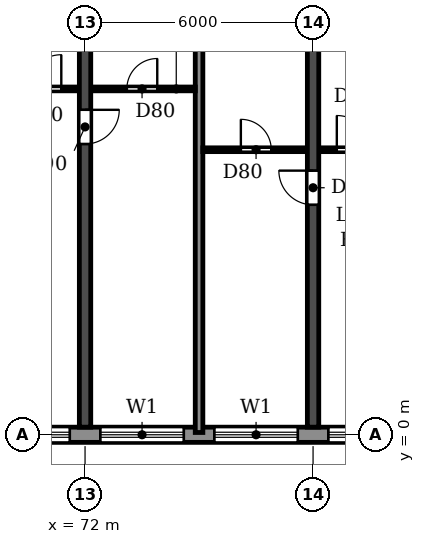
"""IFC4 building model, lengths in metres.
Left out: names, types, materials, properties, quantities, classifications, styles, units other than length and angle.
Written with IfcOpenShell. Run it as: python <this file> out.ifc"""

import sys

from ifc_helpers import new_model, si_unit, direction, frame, frame_2d, origin, place, context, subcontext, project, spatial, rectangle, extrude, element, fill, save


model = new_model("IFC4")
c1 = context("Model", 3, precision=1e-05, world=origin(), true_north=direction((0.0, 1.0)))
c2 = subcontext(c1, "Body", "Model", "MODEL_VIEW")
j1 = project(units=[si_unit("LENGTHUNIT", "METRE"), si_unit("PLANEANGLEUNIT", "RADIAN")], contexts=[c1])
p1 = place(None, origin())
s1 = spatial("IfcSite", under=j1, at=p1, CompositionType="ELEMENT")
p2 = place(p1, origin())
s2 = spatial("IfcBuilding", under=s1, at=p2, CompositionType="ELEMENT")
p3 = place(p2, frame((0.0, 0.0, 142.2)))
s3 = spatial("IfcBuildingStorey", under=s2, at=p3, CompositionType="ELEMENT", Elevation=142.2)
p4 = place(p3, frame((72.0, 0.2, 0.0), z_axis=(0.0, 0.0, 1.0), x_axis=(0.0, 1.0, 0.0)))
e1 = element("IfcWall", 1, at=p4, inside=s3, PredefinedType="SHEAR", context=c2, shape_type="SweptSolid", body=[
    extrude(rectangle(XDim=11.675, YDim=0.3, at=frame_2d((5.837, 0.0))), origin(), (0.0, 0.0, 1.0), 3.07),
])
p5 = place(p4, frame((7.45, 0.0, 0.0)))
e2 = element("IfcOpeningElement", 2, at=p5, cuts=e1, PredefinedType="OPENING", context=c2, shape_type="SweptSolid", body=[
    extrude(rectangle(XDim=0.9, YDim=2.1, at=frame_2d((0.45, 1.05))), frame((0.0, 0.16, 0.0), z_axis=(0.0, -1.0, 0.0), x_axis=(1.0, 0.0, 0.0)), (0.0, 0.0, 1.0), 0.32),
])
p6 = place(p3, frame((78.0, 0.2, 0.0), z_axis=(0.0, 0.0, 1.0), x_axis=(0.0, 1.0, 0.0)))
e3 = element("IfcWall", 3, at=p6, inside=s3, PredefinedType="SHEAR", context=c2, shape_type="SweptSolid", body=[
    extrude(rectangle(XDim=11.675, YDim=0.3, at=frame_2d((5.837, 0.0))), origin(), (0.0, 0.0, 1.0), 3.07),
])
p7 = place(p6, frame((5.85, 0.0, 0.0)))
e4 = element("IfcOpeningElement", 4, at=p7, cuts=e3, PredefinedType="OPENING", context=c2, shape_type="SweptSolid", body=[
    extrude(rectangle(XDim=0.9, YDim=2.1, at=frame_2d((0.45, 1.05))), frame((0.0, 0.16, 0.0), z_axis=(0.0, -1.0, 0.0), x_axis=(1.0, 0.0, 0.0)), (0.0, 0.0, 1.0), 0.32),
])
p8 = place(p3, frame((16.683, 0.0, 0.0), z_axis=(0.0, 0.0, 1.0), x_axis=(1.0, 0.0, 0.0)))
e5 = element("IfcWall", 5, at=p8, inside=s3, PredefinedType="STANDARD", context=c2, shape_type="SweptSolid", body=[
    extrude(rectangle(XDim=68.634, YDim=0.4, at=frame_2d((34.317, 0.0))), origin(), (0.0, 0.0, 1.0), 3.07),
])
p9 = place(p8, frame((1.717, 0.0, 0.9)))
e6 = element("IfcOpeningElement", 6, at=p9, cuts=e5, PredefinedType="OPENING", context=c2, shape_type="SweptSolid", body=[
    extrude(rectangle(XDim=2.2, YDim=1.5, at=frame_2d((1.1, 0.75))), frame((0.0, 0.21, 0.0), z_axis=(0.0, -1.0, 0.0), x_axis=(1.0, 0.0, 0.0)), (0.0, 0.0, 1.0), 0.42),
])
p10 = place(p8, frame((4.717, 0.0, 0.9)))
e7 = element("IfcOpeningElement", 7, at=p10, cuts=e5, PredefinedType="OPENING", context=c2, shape_type="SweptSolid", body=[
    extrude(rectangle(XDim=2.2, YDim=1.5, at=frame_2d((1.1, 0.75))), frame((0.0, 0.21, 0.0), z_axis=(0.0, -1.0, 0.0), x_axis=(1.0, 0.0, 0.0)), (0.0, 0.0, 1.0), 0.42),
])
p11 = place(p8, frame((7.717, 0.0, 0.9)))
e8 = element("IfcOpeningElement", 8, at=p11, cuts=e5, PredefinedType="OPENING", context=c2, shape_type="SweptSolid", body=[
    extrude(rectangle(XDim=2.2, YDim=1.5, at=frame_2d((1.1, 0.75))), frame((0.0, 0.21, 0.0), z_axis=(0.0, -1.0, 0.0), x_axis=(1.0, 0.0, 0.0)), (0.0, 0.0, 1.0), 0.42),
])
p12 = place(p8, frame((10.717, 0.0, 0.9)))
e9 = element("IfcOpeningElement", 9, at=p12, cuts=e5, PredefinedType="OPENING", context=c2, shape_type="SweptSolid", body=[
    extrude(rectangle(XDim=2.2, YDim=1.5, at=frame_2d((1.1, 0.75))), frame((0.0, 0.21, 0.0), z_axis=(0.0, -1.0, 0.0), x_axis=(1.0, 0.0, 0.0)), (0.0, 0.0, 1.0), 0.42),
])
p13 = place(p8, frame((13.717, 0.0, 0.9)))
e10 = element("IfcOpeningElement", 10, at=p13, cuts=e5, PredefinedType="OPENING", context=c2, shape_type="SweptSolid", body=[
    extrude(rectangle(XDim=2.2, YDim=1.5, at=frame_2d((1.1, 0.75))), frame((0.0, 0.21, 0.0), z_axis=(0.0, -1.0, 0.0), x_axis=(1.0, 0.0, 0.0)), (0.0, 0.0, 1.0), 0.42),
])
p14 = place(p8, frame((16.717, 0.0, 0.9)))
e11 = element("IfcOpeningElement", 11, at=p14, cuts=e5, PredefinedType="OPENING", context=c2, shape_type="SweptSolid", body=[
    extrude(rectangle(XDim=2.2, YDim=1.5, at=frame_2d((1.1, 0.75))), frame((0.0, 0.21, 0.0), z_axis=(0.0, -1.0, 0.0), x_axis=(1.0, 0.0, 0.0)), (0.0, 0.0, 1.0), 0.42),
])
p15 = place(p8, frame((19.717, 0.0, 0.9)))
e12 = element("IfcOpeningElement", 12, at=p15, cuts=e5, PredefinedType="OPENING", context=c2, shape_type="SweptSolid", body=[
    extrude(rectangle(XDim=2.2, YDim=1.5, at=frame_2d((1.1, 0.75))), frame((0.0, 0.21, 0.0), z_axis=(0.0, -1.0, 0.0), x_axis=(1.0, 0.0, 0.0)), (0.0, 0.0, 1.0), 0.42),
])
p16 = place(p8, frame((22.717, 0.0, 0.9)))
e13 = element("IfcOpeningElement", 13, at=p16, cuts=e5, PredefinedType="OPENING", context=c2, shape_type="SweptSolid", body=[
    extrude(rectangle(XDim=2.2, YDim=1.5, at=frame_2d((1.1, 0.75))), frame((0.0, 0.21, 0.0), z_axis=(0.0, -1.0, 0.0), x_axis=(1.0, 0.0, 0.0)), (0.0, 0.0, 1.0), 0.42),
])
p17 = place(p8, frame((25.717, 0.0, 0.9)))
e14 = element("IfcOpeningElement", 14, at=p17, cuts=e5, PredefinedType="OPENING", context=c2, shape_type="SweptSolid", body=[
    extrude(rectangle(XDim=2.2, YDim=1.5, at=frame_2d((1.1, 0.75))), frame((0.0, 0.21, 0.0), z_axis=(0.0, -1.0, 0.0), x_axis=(1.0, 0.0, 0.0)), (0.0, 0.0, 1.0), 0.42),
])
p18 = place(p8, frame((28.717, 0.0, 0.9)))
e15 = element("IfcOpeningElement", 15, at=p18, cuts=e5, PredefinedType="OPENING", context=c2, shape_type="SweptSolid", body=[
    extrude(rectangle(XDim=2.2, YDim=1.5, at=frame_2d((1.1, 0.75))), frame((0.0, 0.21, 0.0), z_axis=(0.0, -1.0, 0.0), x_axis=(1.0, 0.0, 0.0)), (0.0, 0.0, 1.0), 0.42),
])
p19 = place(p8, frame((31.717, 0.0, 0.9)))
e16 = element("IfcOpeningElement", 16, at=p19, cuts=e5, PredefinedType="OPENING", context=c2, shape_type="SweptSolid", body=[
    extrude(rectangle(XDim=2.2, YDim=1.5, at=frame_2d((1.1, 0.75))), frame((0.0, 0.21, 0.0), z_axis=(0.0, -1.0, 0.0), x_axis=(1.0, 0.0, 0.0)), (0.0, 0.0, 1.0), 0.42),
])
p20 = place(p8, frame((34.917, 0.0, 0.0)))
e17 = element("IfcOpeningElement", 17, at=p20, cuts=e5, PredefinedType="OPENING", context=c2, shape_type="SweptSolid", body=[
    extrude(rectangle(XDim=1.8, YDim=2.4, at=frame_2d((0.9, 1.2))), frame((0.0, 0.21, 0.0), z_axis=(0.0, -1.0, 0.0), x_axis=(1.0, 0.0, 0.0)), (0.0, 0.0, 1.0), 0.42),
])
p21 = place(p8, frame((37.717, 0.0, 0.9)))
e18 = element("IfcOpeningElement", 18, at=p21, cuts=e5, PredefinedType="OPENING", context=c2, shape_type="SweptSolid", body=[
    extrude(rectangle(XDim=2.2, YDim=1.5, at=frame_2d((1.1, 0.75))), frame((0.0, 0.21, 0.0), z_axis=(0.0, -1.0, 0.0), x_axis=(1.0, 0.0, 0.0)), (0.0, 0.0, 1.0), 0.42),
])
p22 = place(p8, frame((40.717, 0.0, 0.9)))
e19 = element("IfcOpeningElement", 19, at=p22, cuts=e5, PredefinedType="OPENING", context=c2, shape_type="SweptSolid", body=[
    extrude(rectangle(XDim=2.2, YDim=1.5, at=frame_2d((1.1, 0.75))), frame((0.0, 0.21, 0.0), z_axis=(0.0, -1.0, 0.0), x_axis=(1.0, 0.0, 0.0)), (0.0, 0.0, 1.0), 0.42),
])
p23 = place(p8, frame((43.717, 0.0, 0.9)))
e20 = element("IfcOpeningElement", 20, at=p23, cuts=e5, PredefinedType="OPENING", context=c2, shape_type="SweptSolid", body=[
    extrude(rectangle(XDim=2.2, YDim=1.5, at=frame_2d((1.1, 0.75))), frame((0.0, 0.21, 0.0), z_axis=(0.0, -1.0, 0.0), x_axis=(1.0, 0.0, 0.0)), (0.0, 0.0, 1.0), 0.42),
])
p24 = place(p8, frame((46.917, 0.0, 0.0)))
e21 = element("IfcOpeningElement", 21, at=p24, cuts=e5, PredefinedType="OPENING", context=c2, shape_type="SweptSolid", body=[
    extrude(rectangle(XDim=1.8, YDim=2.4, at=frame_2d((0.9, 1.2))), frame((0.0, 0.21, 0.0), z_axis=(0.0, -1.0, 0.0), x_axis=(1.0, 0.0, 0.0)), (0.0, 0.0, 1.0), 0.42),
])
p25 = place(p8, frame((49.717, 0.0, 0.9)))
e22 = element("IfcOpeningElement", 22, at=p25, cuts=e5, PredefinedType="OPENING", context=c2, shape_type="SweptSolid", body=[
    extrude(rectangle(XDim=2.2, YDim=1.5, at=frame_2d((1.1, 0.75))), frame((0.0, 0.21, 0.0), z_axis=(0.0, -1.0, 0.0), x_axis=(1.0, 0.0, 0.0)), (0.0, 0.0, 1.0), 0.42),
])
p26 = place(p8, frame((52.717, 0.0, 0.9)))
e23 = element("IfcOpeningElement", 23, at=p26, cuts=e5, PredefinedType="OPENING", context=c2, shape_type="SweptSolid", body=[
    extrude(rectangle(XDim=2.2, YDim=1.5, at=frame_2d((1.1, 0.75))), frame((0.0, 0.21, 0.0), z_axis=(0.0, -1.0, 0.0), x_axis=(1.0, 0.0, 0.0)), (0.0, 0.0, 1.0), 0.42),
])
p27 = place(p8, frame((55.717, 0.0, 0.9)))
e24 = element("IfcOpeningElement", 24, at=p27, cuts=e5, PredefinedType="OPENING", context=c2, shape_type="SweptSolid", body=[
    extrude(rectangle(XDim=2.2, YDim=1.5, at=frame_2d((1.1, 0.75))), frame((0.0, 0.21, 0.0), z_axis=(0.0, -1.0, 0.0), x_axis=(1.0, 0.0, 0.0)), (0.0, 0.0, 1.0), 0.42),
])
p28 = place(p8, frame((58.717, 0.0, 0.9)))
e25 = element("IfcOpeningElement", 25, at=p28, cuts=e5, PredefinedType="OPENING", context=c2, shape_type="SweptSolid", body=[
    extrude(rectangle(XDim=2.2, YDim=1.5, at=frame_2d((1.1, 0.75))), frame((0.0, 0.21, 0.0), z_axis=(0.0, -1.0, 0.0), x_axis=(1.0, 0.0, 0.0)), (0.0, 0.0, 1.0), 0.42),
])
p29 = place(p8, frame((61.717, 0.0, 0.9)))
e26 = element("IfcOpeningElement", 26, at=p29, cuts=e5, PredefinedType="OPENING", context=c2, shape_type="SweptSolid", body=[
    extrude(rectangle(XDim=2.2, YDim=1.5, at=frame_2d((1.1, 0.75))), frame((0.0, 0.21, 0.0), z_axis=(0.0, -1.0, 0.0), x_axis=(1.0, 0.0, 0.0)), (0.0, 0.0, 1.0), 0.42),
])
p30 = place(p8, frame((64.717, 0.0, 0.9)))
e27 = element("IfcOpeningElement", 27, at=p30, cuts=e5, PredefinedType="OPENING", context=c2, shape_type="SweptSolid", body=[
    extrude(rectangle(XDim=2.2, YDim=1.5, at=frame_2d((1.1, 0.75))), frame((0.0, 0.21, 0.0), z_axis=(0.0, -1.0, 0.0), x_axis=(1.0, 0.0, 0.0)), (0.0, 0.0, 1.0), 0.42),
])
p31 = place(p3, frame((75.0, 0.06, 0.0), z_axis=(0.0, 0.0, 1.0), x_axis=(0.0, 1.0, 0.0)))
e28 = element("IfcWall", 28, at=p31, inside=s3, PredefinedType="PARTITIONING", context=c2, shape_type="SweptSolid", body=[
    extrude(rectangle(XDim=11.805, YDim=0.2, at=frame_2d((5.902, 0.0))), origin(), (0.0, 0.0, 1.0), 3.07),
])
p32 = place(p3, frame((75.1, 7.5, 0.0), z_axis=(0.0, 0.0, 1.0), x_axis=(1.0, 0.0, 0.0)))
e29 = element("IfcWall", 29, at=p32, inside=s3, PredefinedType="PARTITIONING", context=c2, shape_type="SweptSolid", body=[
    extrude(rectangle(XDim=2.74, YDim=0.1, at=frame_2d((1.37, 0.0))), origin(), (0.0, 0.0, 1.0), 3.07),
])
p33 = place(p32, frame((1.0, 0.0, 0.0)))
e30 = element("IfcOpeningElement", 30, at=p33, cuts=e29, PredefinedType="OPENING", context=c2, shape_type="SweptSolid", body=[
    extrude(rectangle(XDim=0.8, YDim=2.1, at=frame_2d((0.4, 1.05))), frame((0.0, 0.06, 0.0), z_axis=(0.0, -1.0, 0.0), x_axis=(1.0, 0.0, 0.0)), (0.0, 0.0, 1.0), 0.12),
])
p34 = place(p3, frame((78.16, 7.5, 0.0), z_axis=(0.0, 0.0, 1.0), x_axis=(1.0, 0.0, 0.0)))
e31 = element("IfcWall", 31, at=p34, inside=s3, PredefinedType="PARTITIONING", context=c2, shape_type="SweptSolid", body=[
    extrude(rectangle(XDim=2.04, YDim=0.1, at=frame_2d((1.02, 0.0))), origin(), (0.0, 0.0, 1.0), 3.07),
])
p35 = place(p34, frame((0.465, 0.0, 0.0)))
e32 = element("IfcOpeningElement", 32, at=p35, cuts=e31, PredefinedType="OPENING", context=c2, shape_type="SweptSolid", body=[
    extrude(rectangle(XDim=0.9, YDim=2.1, at=frame_2d((0.45, 1.05))), frame((0.0, 0.06, 0.0), z_axis=(0.0, -1.0, 0.0), x_axis=(1.0, 0.0, 0.0)), (0.0, 0.0, 1.0), 0.12),
])
p36 = place(p3, frame((69.8, 9.1, 0.0), z_axis=(0.0, 0.0, 1.0), x_axis=(1.0, 0.0, 0.0)))
e33 = element("IfcWall", 33, at=p36, inside=s3, PredefinedType="PARTITIONING", context=c2, shape_type="SweptSolid", body=[
    extrude(rectangle(XDim=2.04, YDim=0.1, at=frame_2d((1.02, 0.0))), origin(), (0.0, 0.0, 1.0), 3.07),
])
p37 = place(p36, frame((0.675, 0.0, 0.0)))
e34 = element("IfcOpeningElement", 34, at=p37, cuts=e33, PredefinedType="OPENING", context=c2, shape_type="SweptSolid", body=[
    extrude(rectangle(XDim=0.9, YDim=2.1, at=frame_2d((0.45, 1.05))), frame((0.0, 0.06, 0.0), z_axis=(0.0, -1.0, 0.0), x_axis=(1.0, 0.0, 0.0)), (0.0, 0.0, 1.0), 0.12),
])
p38 = place(p3, frame((72.16, 9.1, 0.0), z_axis=(0.0, 0.0, 1.0), x_axis=(1.0, 0.0, 0.0)))
e35 = element("IfcWall", 35, at=p38, inside=s3, PredefinedType="PARTITIONING", context=c2, shape_type="SweptSolid", body=[
    extrude(rectangle(XDim=2.74, YDim=0.1, at=frame_2d((1.37, 0.0))), origin(), (0.0, 0.0, 1.0), 3.07),
])
p39 = place(p38, frame((0.94, 0.0, 0.0)))
e36 = element("IfcOpeningElement", 36, at=p39, cuts=e35, PredefinedType="OPENING", context=c2, shape_type="SweptSolid", body=[
    extrude(rectangle(XDim=0.8, YDim=2.1, at=frame_2d((0.4, 1.05))), frame((0.0, 0.06, 0.0), z_axis=(0.0, -1.0, 0.0), x_axis=(1.0, 0.0, 0.0)), (0.0, 0.0, 1.0), 0.12),
])
p40 = place(p26, origin())
e37 = element("IfcWindow", 37, at=p40, inside=s3, PartitioningType="DOUBLE_PANEL_HORIZONTAL", PredefinedType="WINDOW", context=c2, shape_type="SweptSolid", body=[
    extrude(rectangle(XDim=2.2, YDim=1.5, at=frame_2d((1.1, 0.75))), frame((0.0, 0.03, 0.0), z_axis=(0.0, -1.0, 0.0), x_axis=(1.0, 0.0, 0.0)), (0.0, 0.0, 1.0), 0.06),
])
fill(e23, e37)
p41 = place(p27, origin())
e38 = element("IfcWindow", 38, at=p41, inside=s3, PartitioningType="DOUBLE_PANEL_HORIZONTAL", PredefinedType="WINDOW", context=c2, shape_type="SweptSolid", body=[
    extrude(rectangle(XDim=2.2, YDim=1.5, at=frame_2d((1.1, 0.75))), frame((0.0, 0.03, 0.0), z_axis=(0.0, -1.0, 0.0), x_axis=(1.0, 0.0, 0.0)), (0.0, 0.0, 1.0), 0.06),
])
fill(e24, e38)
p42 = place(p28, origin())
e39 = element("IfcWindow", 39, at=p42, inside=s3, PartitioningType="DOUBLE_PANEL_HORIZONTAL", PredefinedType="WINDOW", context=c2, shape_type="SweptSolid", body=[
    extrude(rectangle(XDim=2.2, YDim=1.5, at=frame_2d((1.1, 0.75))), frame((0.0, 0.03, 0.0), z_axis=(0.0, -1.0, 0.0), x_axis=(1.0, 0.0, 0.0)), (0.0, 0.0, 1.0), 0.06),
])
fill(e25, e39)
p43 = place(p29, origin())
e40 = element("IfcWindow", 40, at=p43, inside=s3, PartitioningType="DOUBLE_PANEL_HORIZONTAL", PredefinedType="WINDOW", context=c2, shape_type="SweptSolid", body=[
    extrude(rectangle(XDim=2.2, YDim=1.5, at=frame_2d((1.1, 0.75))), frame((0.0, 0.03, 0.0), z_axis=(0.0, -1.0, 0.0), x_axis=(1.0, 0.0, 0.0)), (0.0, 0.0, 1.0), 0.06),
])
fill(e26, e40)
p44 = place(p39, origin())
e41 = element("IfcDoor", 41, at=p44, inside=s3, OperationType="SINGLE_SWING_RIGHT", PredefinedType="DOOR", context=c2, shape_type="SweptSolid", body=[
    extrude(rectangle(XDim=0.8, YDim=2.1, at=frame_2d((0.4, 1.05))), frame((0.0, 0.025, 0.0), z_axis=(0.0, -1.0, 0.0), x_axis=(1.0, 0.0, 0.0)), (0.0, 0.0, 1.0), 0.05),
])
fill(e36, e41)
p45 = place(p37, origin())
e42 = element("IfcDoor", 42, at=p45, inside=s3, OperationType="SINGLE_SWING_RIGHT", PredefinedType="DOOR", context=c2, shape_type="SweptSolid", body=[
    extrude(rectangle(XDim=0.9, YDim=2.1, at=frame_2d((0.45, 1.05))), frame((0.0, 0.025, 0.0), z_axis=(0.0, -1.0, 0.0), x_axis=(1.0, 0.0, 0.0)), (0.0, 0.0, 1.0), 0.05),
])
fill(e34, e42)
p46 = place(p5, frame((0.9, 0.0, 0.0), z_axis=(0.0, 0.0, 1.0), x_axis=(-1.0, 0.0, 0.0)))
e43 = element("IfcDoor", 43, at=p46, inside=s3, OperationType="SINGLE_SWING_LEFT", PredefinedType="DOOR", context=c2, shape_type="SweptSolid", body=[
    extrude(rectangle(XDim=0.9, YDim=2.1, at=frame_2d((0.45, 1.05))), frame((0.0, 0.025, 0.0), z_axis=(0.0, -1.0, 0.0), x_axis=(1.0, 0.0, 0.0)), (0.0, 0.0, 1.0), 0.05),
])
fill(e2, e43)
p47 = place(p33, origin())
e44 = element("IfcDoor", 44, at=p47, inside=s3, OperationType="SINGLE_SWING_LEFT", PredefinedType="DOOR", context=c2, shape_type="SweptSolid", body=[
    extrude(rectangle(XDim=0.8, YDim=2.1, at=frame_2d((0.4, 1.05))), frame((0.0, 0.025, 0.0), z_axis=(0.0, -1.0, 0.0), x_axis=(1.0, 0.0, 0.0)), (0.0, 0.0, 1.0), 0.05),
])
fill(e30, e44)
p48 = place(p7, origin())
e45 = element("IfcDoor", 45, at=p48, inside=s3, OperationType="SINGLE_SWING_RIGHT", PredefinedType="DOOR", context=c2, shape_type="SweptSolid", body=[
    extrude(rectangle(XDim=0.9, YDim=2.1, at=frame_2d((0.45, 1.05))), frame((0.0, 0.025, 0.0), z_axis=(0.0, -1.0, 0.0), x_axis=(1.0, 0.0, 0.0)), (0.0, 0.0, 1.0), 0.05),
])
fill(e4, e45)
p49 = place(p35, origin())
e46 = element("IfcDoor", 46, at=p49, inside=s3, OperationType="SINGLE_SWING_LEFT", PredefinedType="DOOR", context=c2, shape_type="SweptSolid", body=[
    extrude(rectangle(XDim=0.9, YDim=2.1, at=frame_2d((0.45, 1.05))), frame((0.0, 0.025, 0.0), z_axis=(0.0, -1.0, 0.0), x_axis=(1.0, 0.0, 0.0)), (0.0, 0.0, 1.0), 0.05),
])
fill(e32, e46)
save(model, sys.argv[1])
